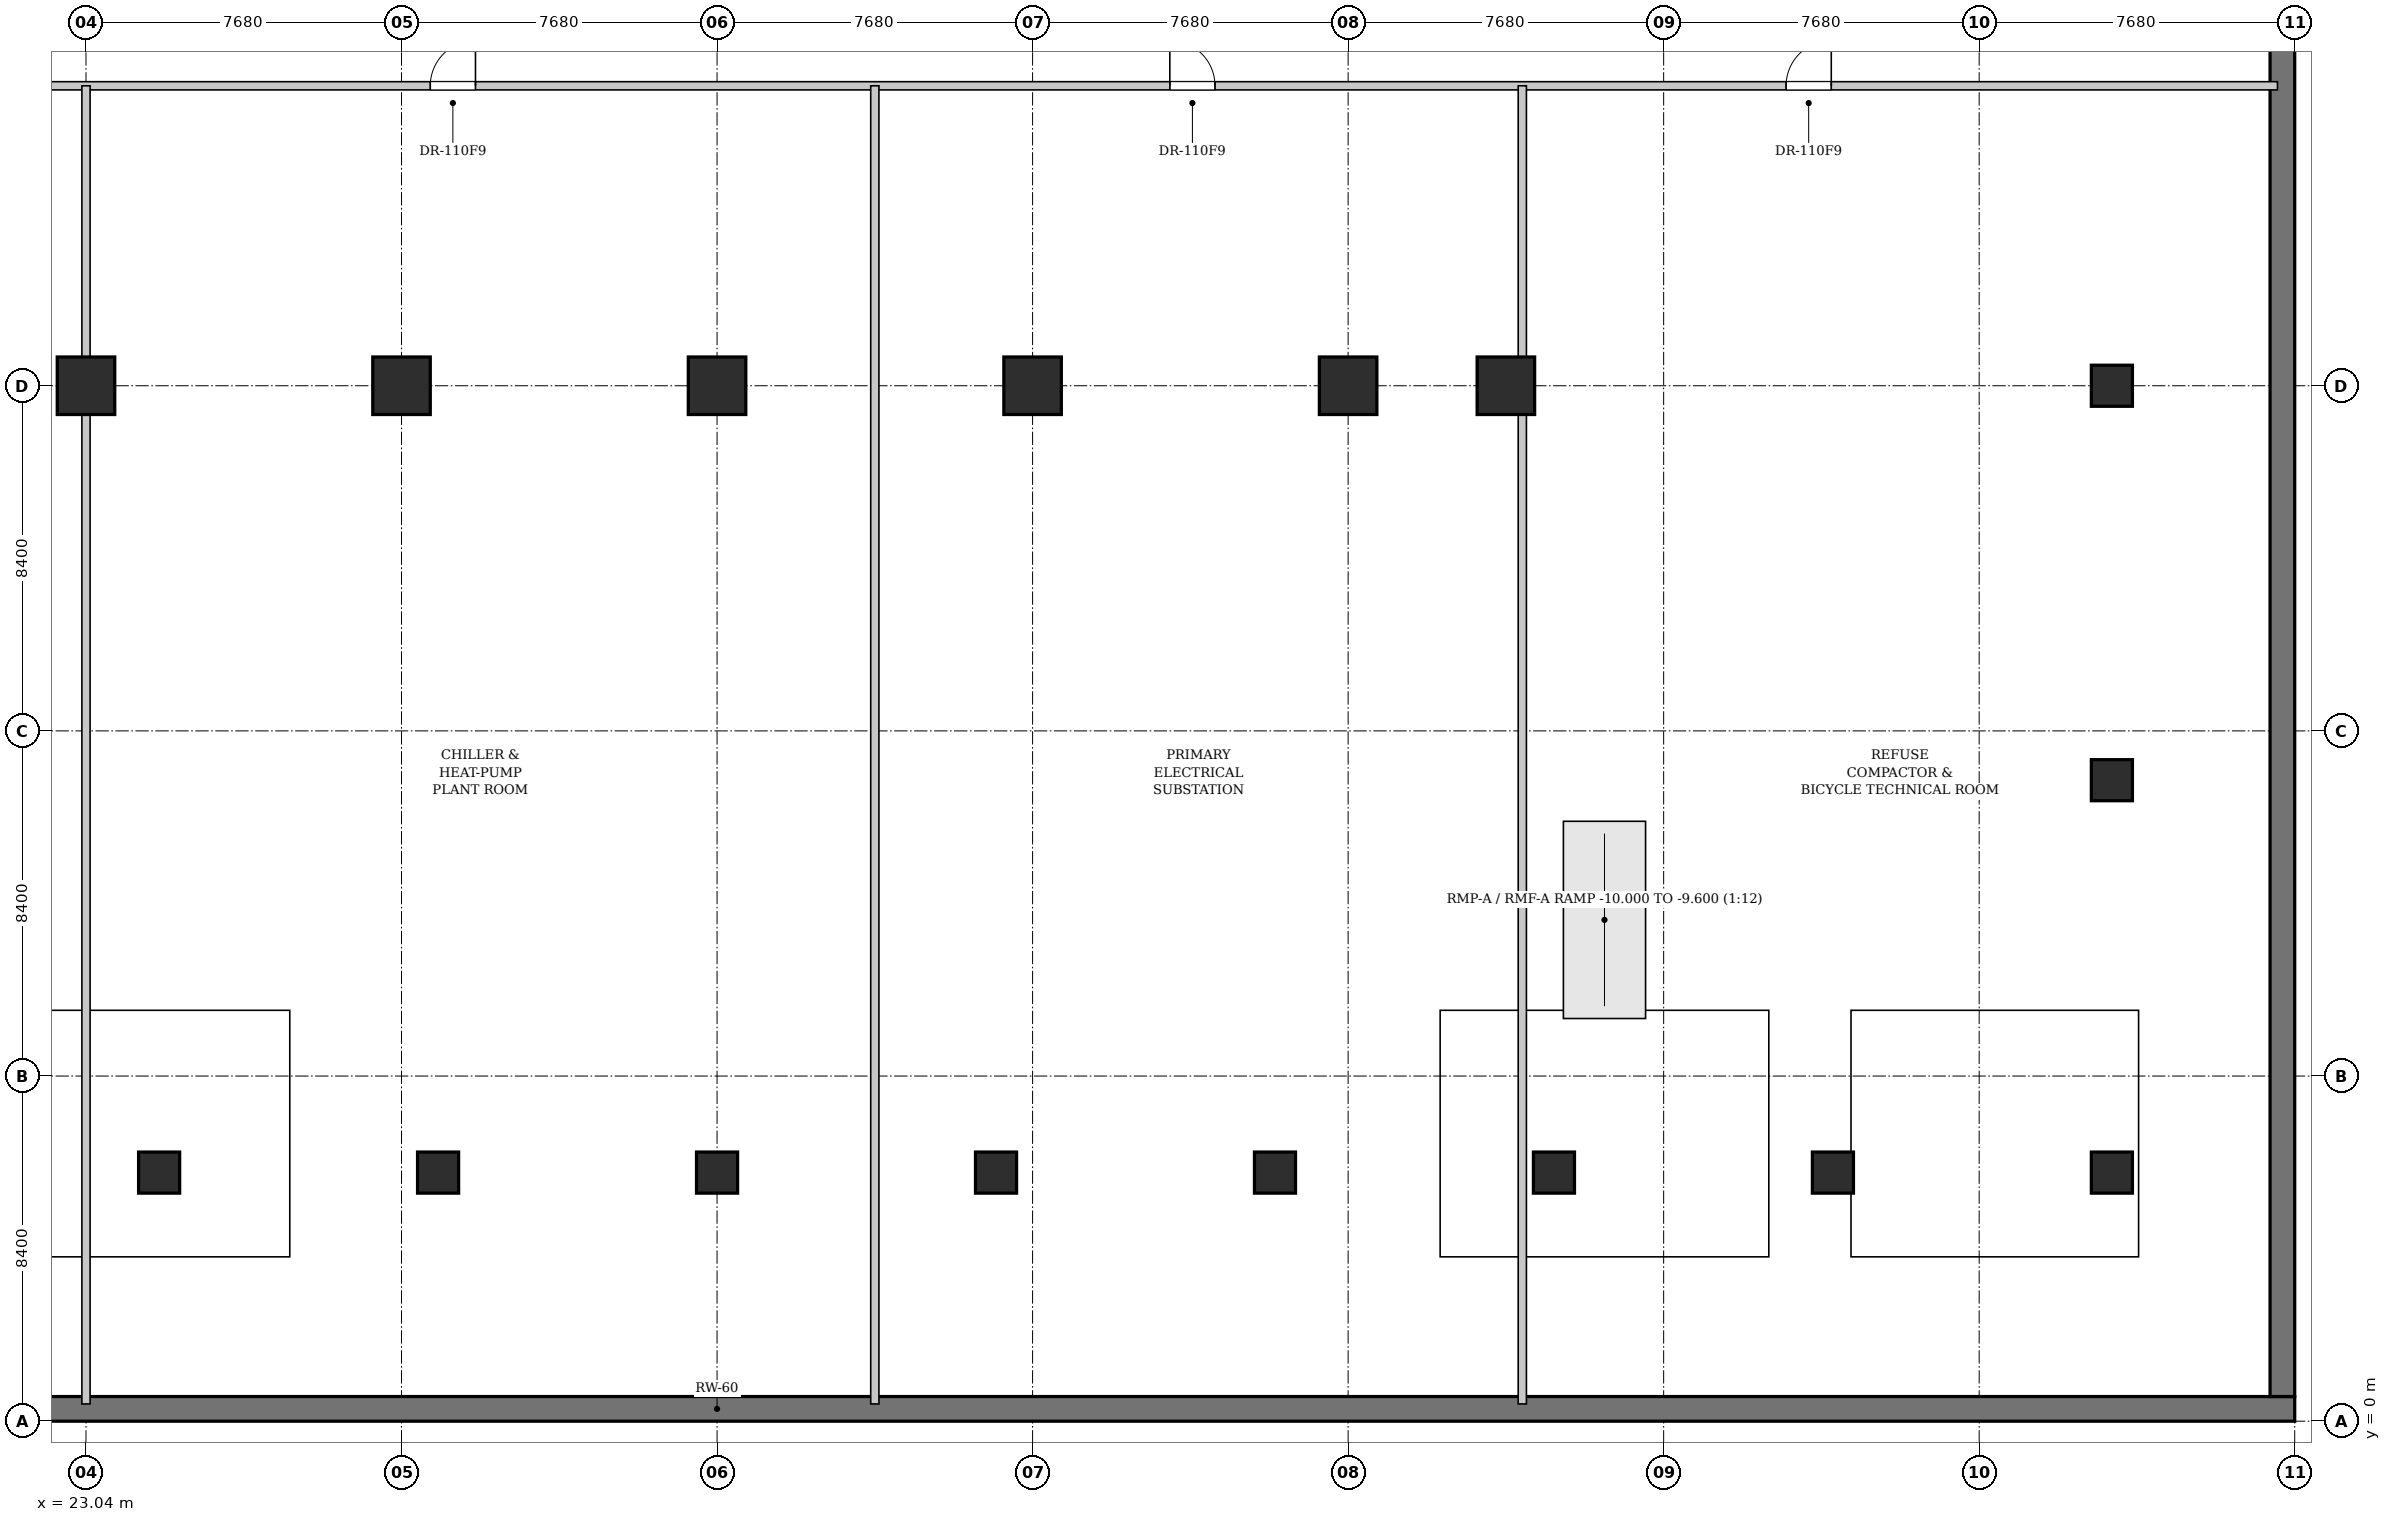
"""IFC4 building model, lengths in metres.
Left out: names, types, materials, properties, quantities, classifications, styles, units other than length and angle.
Written with IfcOpenShell. Run it as: python <this file> out.ifc"""

import sys

from ifc_helpers import new_model, si_unit, direction, frame, frame_2d, origin, origin_2d, place, context, subcontext, project, spatial, rectangle, extrude, element, fill, save


model = new_model("IFC4")
c1 = context("Model", 3, precision=1e-05, world=origin(), true_north=direction((0.0, 1.0)))
c2 = subcontext(c1, "Body", "Model", "MODEL_VIEW")
j1 = project(units=[si_unit("LENGTHUNIT", "METRE"), si_unit("PLANEANGLEUNIT", "RADIAN")], contexts=[c1])
p1 = place(None, origin())
s1 = spatial("IfcSite", under=j1, at=p1, CompositionType="ELEMENT")
p2 = place(p1, origin())
s2 = spatial("IfcBuilding", under=s1, at=p2, CompositionType="ELEMENT")
p3 = place(p2, frame((0.0, 0.0, -10.0)))
s3 = spatial("IfcBuildingStorey", under=s2, at=p3, CompositionType="ELEMENT", Elevation=-10.0)
p4 = place(p3, frame((0.0, 0.3, 0.0), z_axis=(0.0, 0.0, 1.0), x_axis=(1.0, 0.0, 0.0)))
e1 = element("IfcWall", 1, at=p4, inside=s3, PredefinedType="USERDEFINED", context=c2, shape_type="SweptSolid", body=[
    extrude(rectangle(XDim=76.8, YDim=0.6, at=frame_2d((38.4, 0.0))), origin(), (0.0, 0.0, 1.0), 4.65),
])
p5 = place(p3, frame((76.5, 0.6, 0.0), z_axis=(0.0, 0.0, 1.0), x_axis=(0.0, 1.0, 0.0)))
e2 = element("IfcWall", 2, at=p5, inside=s3, PredefinedType="USERDEFINED", context=c2, shape_type="SweptSolid", body=[
    extrude(rectangle(XDim=49.2, YDim=0.6, at=frame_2d((24.6, 0.0))), origin(), (0.0, 0.0, 1.0), 4.65),
])
for number, where, z_axis, x_axis in (
    (3, (23.04, 25.2, 0.0), (0.0, 0.0, 1.0), (1.0, 0.0, 0.0)),
    (4, (30.72, 25.2, 0.0), (0.0, 0.0, 1.0), (1.0, 0.0, 0.0)),
    (5, (38.4, 25.2, 0.0), (0.0, 0.0, 1.0), (1.0, 0.0, 0.0)),
    (6, (46.08, 25.2, 0.0), (0.0, 0.0, 1.0), (1.0, 0.0, 0.0)),
    (7, (53.76, 25.2, 0.0), (0.0, 0.0, 1.0), (1.0, 0.0, 0.0)),
    (8, (57.6, 25.2, 0.0), (0.0, 0.0, 1.0), (1.0, 0.0, 0.0)),
):
    element("IfcColumn", number, at=place(p3, frame(where, z_axis=z_axis, x_axis=x_axis)), inside=s3, PredefinedType="COLUMN", context=c2, shape_type="SweptSolid", body=[
        extrude(rectangle(XDim=1.4, YDim=1.4, at=origin_2d()), origin(), (0.0, 0.0, 1.0), 5.0),
    ])
for number, where, z_axis, x_axis in (
    (9, (24.82, 6.05, 0.0), (0.0, 0.0, 1.0), (1.0, 0.0, 0.0)),
    (10, (31.61, 6.05, 0.0), (0.0, 0.0, 1.0), (1.0, 0.0, 0.0)),
    (11, (38.4, 6.05, 0.0), (0.0, 0.0, 1.0), (1.0, 0.0, 0.0)),
    (12, (45.19, 6.05, 0.0), (0.0, 0.0, 1.0), (1.0, 0.0, 0.0)),
    (13, (51.98, 6.05, 0.0), (0.0, 0.0, 1.0), (1.0, 0.0, 0.0)),
    (14, (58.77, 6.05, 0.0), (0.0, 0.0, 1.0), (1.0, 0.0, 0.0)),
    (15, (65.56, 6.05, 0.0), (0.0, 0.0, 1.0), (1.0, 0.0, 0.0)),
    (16, (72.35, 6.05, 0.0), (0.0, 0.0, 1.0), (1.0, 0.0, 0.0)),
    (17, (72.35, 15.6, 0.0), (0.0, 0.0, 1.0), (1.0, 0.0, 0.0)),
    (18, (72.35, 25.2, 0.0), (0.0, 0.0, 1.0), (1.0, 0.0, 0.0)),
):
    element("IfcColumn", number, at=place(p3, frame(where, z_axis=z_axis, x_axis=x_axis)), inside=s3, PredefinedType="COLUMN", context=c2, shape_type="SweptSolid", body=[
        extrude(rectangle(XDim=1.0, YDim=1.0, at=origin_2d()), origin(), (0.0, 0.0, 1.0), 5.0),
    ])
p6 = place(p3, frame((0.42, 32.5, 0.0), z_axis=(0.0, 0.0, 1.0), x_axis=(1.0, 0.0, 0.0)))
e19 = element("IfcWall", 19, at=p6, inside=s3, PredefinedType="PARTITIONING", context=c2, shape_type="SweptSolid", body=[
    extrude(rectangle(XDim=75.96, YDim=0.2, at=frame_2d((37.98, 0.0))), origin(), (0.0, 0.0, 1.0), 3.845),
])
p7 = place(p6, frame((9.0, 0.0, 0.0)))
e20 = element("IfcOpeningElement", 20, at=p7, cuts=e19, PredefinedType="OPENING", context=c2, shape_type="SweptSolid", body=[
    extrude(rectangle(XDim=1.1, YDim=2.15, at=frame_2d((0.55, 1.075))), frame((0.0, 0.11, 0.0), z_axis=(0.0, -1.0, 0.0), x_axis=(1.0, 0.0, 0.0)), (0.0, 0.0, 1.0), 0.22),
])
p8 = place(p6, frame((31.0, 0.0, 0.0)))
e21 = element("IfcOpeningElement", 21, at=p8, cuts=e19, PredefinedType="OPENING", context=c2, shape_type="SweptSolid", body=[
    extrude(rectangle(XDim=1.1, YDim=2.15, at=frame_2d((0.55, 1.075))), frame((0.0, 0.11, 0.0), z_axis=(0.0, -1.0, 0.0), x_axis=(1.0, 0.0, 0.0)), (0.0, 0.0, 1.0), 0.22),
])
p9 = place(p6, frame((49.0, 0.0, 0.0)))
e22 = element("IfcOpeningElement", 22, at=p9, cuts=e19, PredefinedType="OPENING", context=c2, shape_type="SweptSolid", body=[
    extrude(rectangle(XDim=1.1, YDim=2.15, at=frame_2d((0.55, 1.075))), frame((0.0, 0.11, 0.0), z_axis=(0.0, -1.0, 0.0), x_axis=(1.0, 0.0, 0.0)), (0.0, 0.0, 1.0), 0.22),
])
p10 = place(p6, frame((64.0, 0.0, 0.0)))
e23 = element("IfcOpeningElement", 23, at=p10, cuts=e19, PredefinedType="OPENING", context=c2, shape_type="SweptSolid", body=[
    extrude(rectangle(XDim=1.1, YDim=2.15, at=frame_2d((0.55, 1.075))), frame((0.0, 0.11, 0.0), z_axis=(0.0, -1.0, 0.0), x_axis=(1.0, 0.0, 0.0)), (0.0, 0.0, 1.0), 0.22),
])
p11 = place(p3, frame((23.04, 0.42, 0.0), z_axis=(0.0, 0.0, 1.0), x_axis=(0.0, 1.0, 0.0)))
e24 = element("IfcWall", 24, at=p11, inside=s3, PredefinedType="PARTITIONING", context=c2, shape_type="SweptSolid", body=[
    extrude(rectangle(XDim=32.08, YDim=0.2, at=frame_2d((16.04, 0.0))), origin(), (0.0, 0.0, 1.0), 3.845),
])
p12 = place(p3, frame((42.24, 0.42, 0.0), z_axis=(0.0, 0.0, 1.0), x_axis=(0.0, 1.0, 0.0)))
e25 = element("IfcWall", 25, at=p12, inside=s3, PredefinedType="PARTITIONING", context=c2, shape_type="SweptSolid", body=[
    extrude(rectangle(XDim=32.08, YDim=0.2, at=frame_2d((16.04, 0.0))), origin(), (0.0, 0.0, 1.0), 4.65),
])
p13 = place(p3, frame((58.0, 0.42, 0.0), z_axis=(0.0, 0.0, 1.0), x_axis=(0.0, 1.0, 0.0)))
e26 = element("IfcWall", 26, at=p13, inside=s3, PredefinedType="PARTITIONING", context=c2, shape_type="SweptSolid", body=[
    extrude(rectangle(XDim=32.08, YDim=0.2, at=frame_2d((16.04, 0.0))), origin(), (0.0, 0.0, 1.0), 3.845),
])
p14 = place(p8, origin())
e27 = element("IfcDoor", 27, at=p14, inside=s3, OperationType="SINGLE_SWING_RIGHT", PredefinedType="DOOR", context=c2, shape_type="SweptSolid", body=[
    extrude(rectangle(XDim=1.1, YDim=2.15, at=frame_2d((0.55, 1.075))), frame((0.0, 0.025, 0.0), z_axis=(0.0, -1.0, 0.0), x_axis=(1.0, 0.0, 0.0)), (0.0, 0.0, 1.0), 0.05),
])
fill(e21, e27)
p15 = place(p9, origin())
e28 = element("IfcDoor", 28, at=p15, inside=s3, OperationType="SINGLE_SWING_LEFT", PredefinedType="DOOR", context=c2, shape_type="SweptSolid", body=[
    extrude(rectangle(XDim=1.1, YDim=2.15, at=frame_2d((0.55, 1.075))), frame((0.0, 0.025, 0.0), z_axis=(0.0, -1.0, 0.0), x_axis=(1.0, 0.0, 0.0)), (0.0, 0.0, 1.0), 0.05),
])
fill(e22, e28)
p16 = place(p10, origin())
e29 = element("IfcDoor", 29, at=p16, inside=s3, OperationType="SINGLE_SWING_RIGHT", PredefinedType="DOOR", context=c2, shape_type="SweptSolid", body=[
    extrude(rectangle(XDim=1.1, YDim=2.15, at=frame_2d((0.55, 1.075))), frame((0.0, 0.025, 0.0), z_axis=(0.0, -1.0, 0.0), x_axis=(1.0, 0.0, 0.0)), (0.0, 0.0, 1.0), 0.05),
])
fill(e23, e29)
save(model, sys.argv[1])
